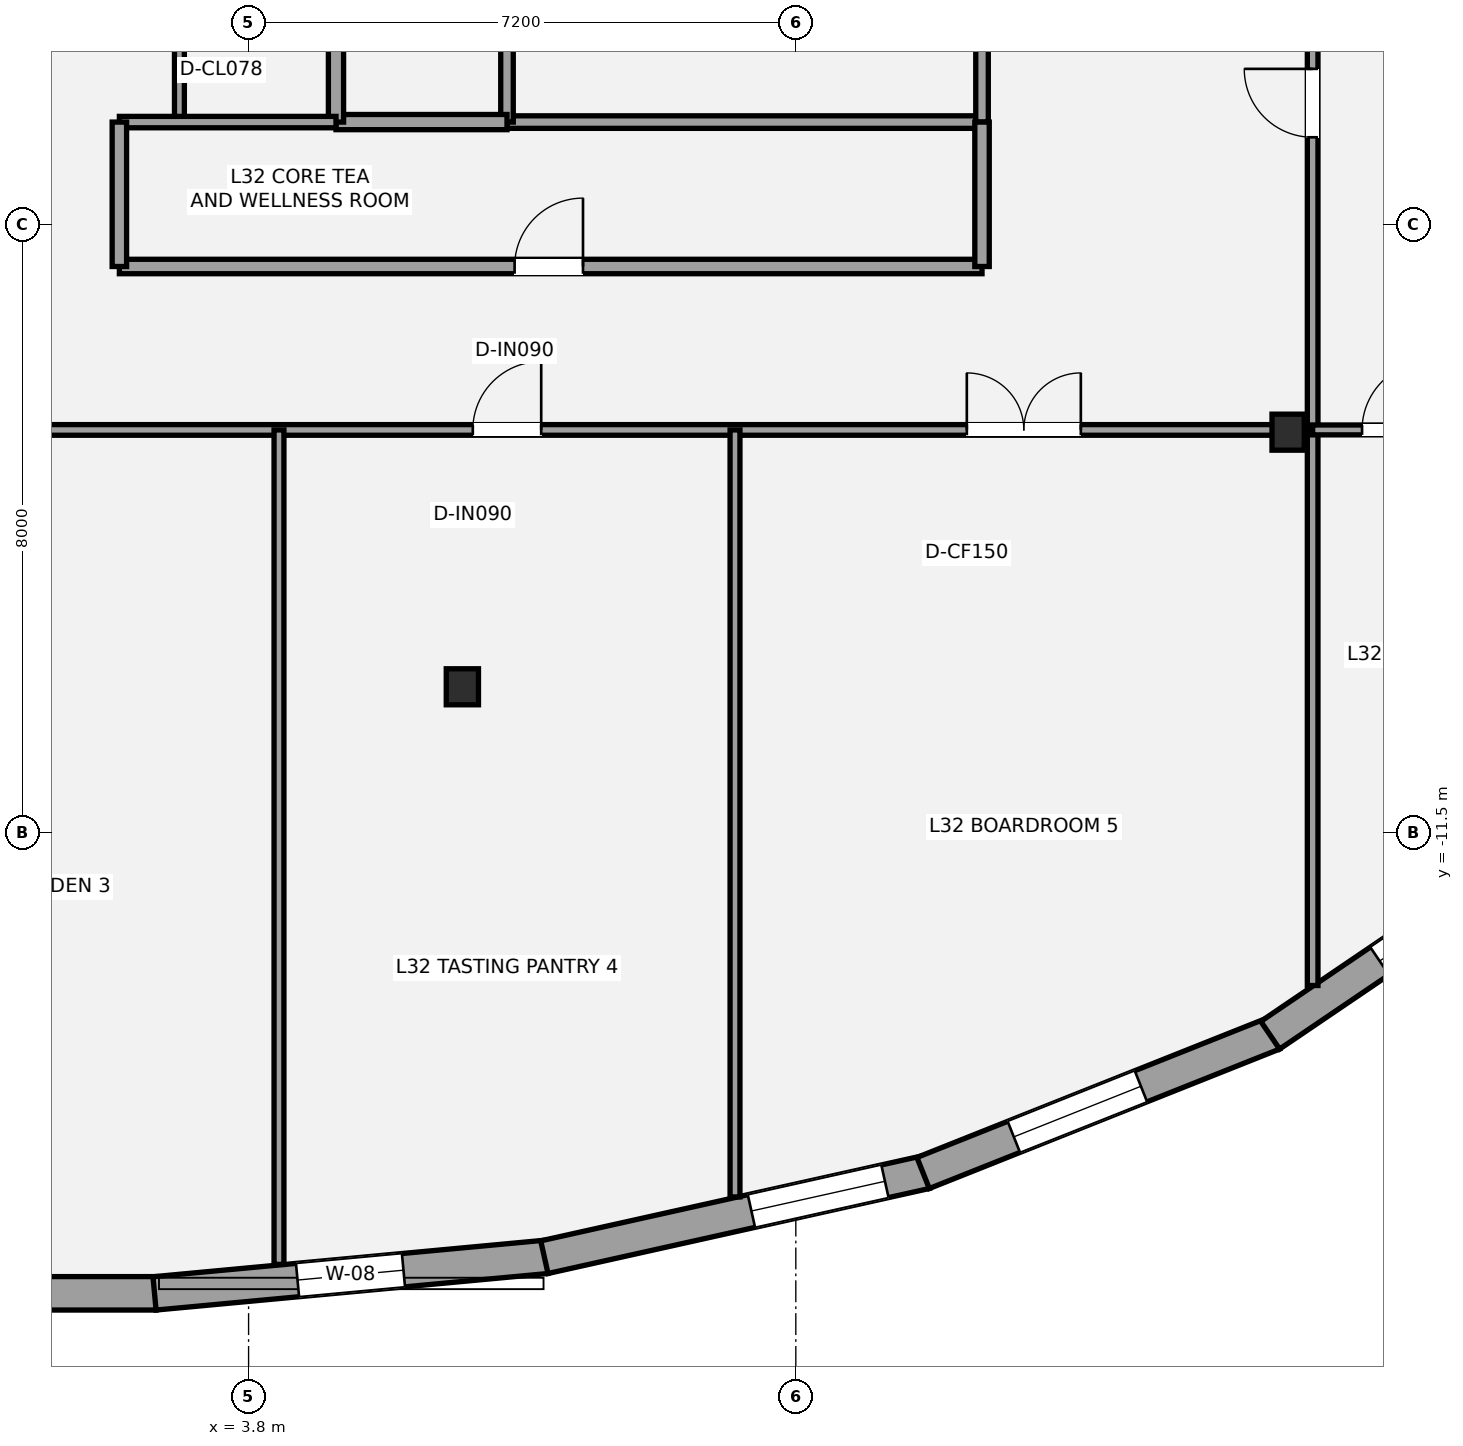
"""IFC4 building model, lengths in metres.
Left out: names, types, materials, properties, quantities, classifications, styles, units other than length and angle.
Written with IfcOpenShell. Run it as: python <this file> out.ifc"""

import sys

from ifc_helpers import new_model, si_unit, direction, frame, frame_2d, origin, origin_2d, place, context, subcontext, project, spatial, rectangle, i_section, extrude, element, fill, save


model = new_model("IFC4")
c1 = context("Model", 3, precision=1e-05, world=origin(), true_north=direction((0.0, 1.0)))
c2 = subcontext(c1, "Body", "Model", "MODEL_VIEW")
j1 = project(units=[si_unit("LENGTHUNIT", "METRE"), si_unit("PLANEANGLEUNIT", "RADIAN")], contexts=[c1])
p1 = place(None, origin())
s1 = spatial("IfcSite", under=j1, at=p1, CompositionType="ELEMENT")
p2 = place(p1, origin())
s2 = spatial("IfcBuilding", under=s1, at=p2, CompositionType="ELEMENT")
p3 = place(p2, frame((0.0, 0.0, 121.1)))
s3 = spatial("IfcBuildingStorey", under=s2, at=p3, CompositionType="ELEMENT", Elevation=121.1)
for number, where, z_axis, x_axis in (
    (1, (6.613, -9.579, 0.0), (0.0, 0.0, 1.0), (1.0, 0.0, 0.0)),
    (2, (17.477, -6.229, 0.0), (0.0, 0.0, 1.0), (1.0, 0.0, 0.0)),
):
    element("IfcColumn", number, at=place(p3, frame(where, z_axis=z_axis, x_axis=x_axis)), inside=s3, PredefinedType="COLUMN", context=c2, shape_type="SweptSolid", body=[
        extrude(i_section(OverallWidth=0.424, OverallDepth=0.474, WebThickness=0.048, FlangeThickness=0.077, at=origin_2d()), origin(), (0.0, 0.0, 1.0), 3.5),
    ])
p4 = place(p3, frame((2.583, -17.559, 0.0), z_axis=(0.0, 0.0, 1.0), x_axis=(-1.0, 0.0, 0.0)))
e3 = element("IfcWall", 3, at=p4, inside=s3, PredefinedType="STANDARD", context=c2, shape_type="SweptSolid", body=[
    extrude(rectangle(XDim=5.166, YDim=0.44, at=frame_2d((2.583, 0.0))), origin(), (0.0, 0.0, 1.0), 2.528),
])
p5 = place(p4, frame((1.436, 0.0, 0.65)))
e4 = element("IfcOpeningElement", 4, at=p5, cuts=e3, PredefinedType="OPENING", context=c2, shape_type="SweptSolid", body=[
    extrude(rectangle(XDim=1.8, YDim=1.7, at=frame_2d((0.9, 0.85))), frame((0.0, 0.23, 0.0), z_axis=(0.0, -1.0, 0.0), x_axis=(1.0, 0.0, 0.0)), (0.0, 0.0, 1.0), 0.46),
])
p6 = place(p3, frame((7.719, -17.079, 0.0), z_axis=(0.0, 0.0, 1.0), x_axis=(-0.995683099415, -0.092817916047, 0.0)))
e5 = element("IfcWall", 5, at=p6, inside=s3, PredefinedType="STANDARD", context=c2, shape_type="SweptSolid", body=[
    extrude(rectangle(XDim=5.179, YDim=0.44, at=frame_2d((2.59, 0.0))), origin(), (0.0, 0.0, 1.0), 2.528),
])
p7 = place(p6, frame((1.89, 0.0, 0.85)))
e6 = element("IfcOpeningElement", 6, at=p7, cuts=e5, PredefinedType="OPENING", context=c2, shape_type="SweptSolid", body=[
    extrude(rectangle(XDim=1.4, YDim=1.55, at=frame_2d((0.7, 0.775))), frame((0.0, 0.23, 0.0), z_axis=(0.0, -1.0, 0.0), x_axis=(1.0, 0.0, 0.0)), (0.0, 0.0, 1.0), 0.46),
])
p8 = place(p3, frame((12.708, -15.966, 0.0), z_axis=(0.0, 0.0, 1.0), x_axis=(-0.976058355685, -0.217508818896, 0.0)))
e7 = element("IfcWall", 7, at=p8, inside=s3, PredefinedType="STANDARD", context=c2, shape_type="SweptSolid", body=[
    extrude(rectangle(XDim=5.14, YDim=0.44, at=frame_2d((2.57, 0.0))), origin(), (0.0, 0.0, 1.0), 2.528),
])
p9 = place(p8, frame((0.549, 0.0, 0.65)))
e8 = element("IfcOpeningElement", 8, at=p9, cuts=e7, PredefinedType="OPENING", context=c2, shape_type="SweptSolid", body=[
    extrude(rectangle(XDim=1.8, YDim=1.7, at=frame_2d((0.9, 0.85))), frame((0.0, 0.23, 0.0), z_axis=(0.0, -1.0, 0.0), x_axis=(1.0, 0.0, 0.0)), (0.0, 0.0, 1.0), 0.46),
])
p10 = place(p3, frame((17.284, -14.141, 0.0), z_axis=(0.0, 0.0, 1.0), x_axis=(-0.929089765506, -0.369854305953, 0.0)))
e9 = element("IfcWall", 9, at=p10, inside=s3, PredefinedType="STANDARD", context=c2, shape_type="SweptSolid", body=[
    extrude(rectangle(XDim=4.961, YDim=0.44, at=frame_2d((2.48, 0.0))), origin(), (0.0, 0.0, 1.0), 2.528),
])
p11 = place(p10, frame((1.876, 0.0, 0.65)))
e10 = element("IfcOpeningElement", 10, at=p11, cuts=e9, PredefinedType="OPENING", context=c2, shape_type="SweptSolid", body=[
    extrude(rectangle(XDim=1.8, YDim=1.7, at=frame_2d((0.9, 0.85))), frame((0.0, 0.23, 0.0), z_axis=(0.0, -1.0, 0.0), x_axis=(1.0, 0.0, 0.0)), (0.0, 0.0, 1.0), 0.46),
])
p12 = place(p3, frame((21.036, -11.591, 0.0), z_axis=(0.0, 0.0, 1.0), x_axis=(-0.827707240431, -0.56116015908, 0.0)))
e11 = element("IfcWall", 11, at=p12, inside=s3, PredefinedType="STANDARD", context=c2, shape_type="SweptSolid", body=[
    extrude(rectangle(XDim=4.584, YDim=0.44, at=frame_2d((2.292, 0.0))), origin(), (0.0, 0.0, 1.0), 2.528),
])
p13 = place(p12, frame((1.044, 0.0, 0.65)))
e12 = element("IfcOpeningElement", 12, at=p13, cuts=e11, PredefinedType="OPENING", context=c2, shape_type="SweptSolid", body=[
    extrude(rectangle(XDim=1.8, YDim=1.7, at=frame_2d((0.9, 0.85))), frame((0.0, 0.23, 0.0), z_axis=(0.0, -1.0, 0.0), x_axis=(1.0, 0.0, 0.0)), (0.0, 0.0, 1.0), 0.46),
])
p14 = place(p3, frame((7.2, -2.15, 0.0), z_axis=(0.0, 0.0, 1.0), x_axis=(1.0, 0.0, 0.0)))
e13 = element("IfcWall", 13, at=p14, inside=s3, PredefinedType="PARTITIONING", context=c2, shape_type="SweptSolid", body=[
    extrude(rectangle(XDim=6.25, YDim=0.165, at=frame_2d((3.125, 0.0))), origin(), (0.0, 0.0, 1.0), 3.31),
])
p15 = place(p3, frame((7.2, -2.15, 0.0), z_axis=(0.0, 0.0, 1.0), x_axis=(0.0, 1.0, 0.0)))
e14 = element("IfcWall", 14, at=p15, inside=s3, PredefinedType="PARTITIONING", context=c2, shape_type="SweptSolid", body=[
    extrude(rectangle(XDim=3.3, YDim=0.165, at=frame_2d((1.65, 0.0))), origin(), (0.0, 0.0, 1.0), 2.763),
])
p16 = place(p3, frame((13.45, -2.15, 0.0), z_axis=(0.0, 0.0, 1.0), x_axis=(0.0, 1.0, 0.0)))
e15 = element("IfcWall", 15, at=p16, inside=s3, PredefinedType="PARTITIONING", context=c2, shape_type="SweptSolid", body=[
    extrude(rectangle(XDim=3.3, YDim=0.165, at=frame_2d((1.65, 0.0))), origin(), (0.0, 0.0, 1.0), 2.763),
])
p17 = place(p16, frame((1.15, 0.0, 0.0)))
e16 = element("IfcOpeningElement", 16, at=p17, cuts=e15, PredefinedType="OPENING", context=c2, shape_type="SweptSolid", body=[
    extrude(rectangle(XDim=1.05, YDim=2.15, at=frame_2d((0.525, 1.075))), frame((0.0, 0.093, 0.0), z_axis=(0.0, -1.0, 0.0), x_axis=(1.0, 0.0, 0.0)), (0.0, 0.0, 1.0), 0.185),
])
p18 = place(p3, frame((4.95, -2.15, 0.0), z_axis=(0.0, 0.0, 1.0), x_axis=(1.0, 0.0, 0.0)))
e17 = element("IfcWall", 17, at=p18, inside=s3, PredefinedType="SOLIDWALL", context=c2, shape_type="SweptSolid", body=[
    extrude(rectangle(XDim=2.25, YDim=0.2, at=frame_2d((1.125, 0.0))), origin(), (0.0, 0.0, 1.0), 3.31),
])
p19 = place(p3, frame((4.95, -2.15, 0.0), z_axis=(0.0, 0.0, 1.0), x_axis=(0.0, 1.0, 0.0)))
e18 = element("IfcWall", 18, at=p19, inside=s3, PredefinedType="SOLIDWALL", context=c2, shape_type="SweptSolid", body=[
    extrude(rectangle(XDim=3.3, YDim=0.2, at=frame_2d((1.65, 0.0))), origin(), (0.0, 0.0, 1.0), 2.763),
])
p20 = place(p19, frame((0.95, 0.0, 0.0)))
e19 = element("IfcOpeningElement", 19, at=p20, cuts=e18, PredefinedType="OPENING", context=c2, shape_type="SweptSolid", body=[
    extrude(rectangle(XDim=0.75, YDim=2.1, at=frame_2d((0.375, 1.05))), frame((0.0, 0.11, 0.0), z_axis=(0.0, -1.0, 0.0), x_axis=(1.0, 0.0, 0.0)), (0.0, 0.0, 1.0), 0.22),
])
p21 = place(p3, frame((2.89, -2.15, 0.0), z_axis=(0.0, 0.0, 1.0), x_axis=(0.0, 1.0, 0.0)))
e20 = element("IfcWall", 20, at=p21, inside=s3, PredefinedType="PARTITIONING", context=c2, shape_type="SweptSolid", body=[
    extrude(rectangle(XDim=1.8, YDim=0.13, at=frame_2d((0.9, 0.0))), origin(), (0.0, 0.0, 1.0), 3.31),
])
p22 = place(p3, frame((2.1, -4.05, 0.0), z_axis=(0.0, 0.0, 1.0), x_axis=(1.0, 0.0, 0.0)))
e21 = element("IfcWall", 21, at=p22, inside=s3, PredefinedType="PLUMBINGWALL", context=c2, shape_type="SweptSolid", body=[
    extrude(rectangle(XDim=11.35, YDim=0.19, at=frame_2d((5.675, 0.0))), origin(), (0.0, 0.0, 1.0), 2.763),
])
p23 = place(p22, frame((5.2, 0.0, 0.0)))
e22 = element("IfcOpeningElement", 22, at=p23, cuts=e21, PredefinedType="OPENING", context=c2, shape_type="SweptSolid", body=[
    extrude(rectangle(XDim=0.9, YDim=2.1, at=frame_2d((0.45, 1.05))), frame((0.0, 0.105, 0.0), z_axis=(0.0, -1.0, 0.0), x_axis=(1.0, 0.0, 0.0)), (0.0, 0.0, 1.0), 0.21),
])
p24 = place(p3, frame((2.1, -2.15, 0.0), z_axis=(0.0, 0.0, 1.0), x_axis=(1.0, 0.0, 0.0)))
e23 = element("IfcWall", 23, at=p24, inside=s3, PredefinedType="PLUMBINGWALL", context=c2, shape_type="SweptSolid", body=[
    extrude(rectangle(XDim=2.85, YDim=0.15, at=frame_2d((1.425, 0.0))), origin(), (0.0, 0.0, 1.0), 3.31),
])
for number, where, z_axis, x_axis in (
    (24, (2.1, -4.05, 0.0), (0.0, 0.0, 1.0), (0.0, 1.0, 0.0)),
    (25, (13.45, -4.05, 0.0), (0.0, 0.0, 1.0), (0.0, 1.0, 0.0)),
):
    element("IfcWall", number, at=place(p3, frame(where, z_axis=z_axis, x_axis=x_axis)), inside=s3, PredefinedType="PLUMBINGWALL", context=c2, shape_type="SweptSolid", body=[
        extrude(rectangle(XDim=1.9, YDim=0.19, at=frame_2d((0.95, 0.0))), origin(), (0.0, 0.0, 1.0), 3.31),
    ])
p25 = place(p3, frame((-16.2, -6.2, 0.0), z_axis=(0.0, 0.0, 1.0), x_axis=(1.0, 0.0, 0.0)))
e26 = element("IfcWall", 26, at=p25, inside=s3, PredefinedType="PARTITIONING", context=c2, shape_type="SweptSolid", body=[
    extrude(rectangle(XDim=34.0, YDim=0.14, at=frame_2d((17.0, 0.0))), origin(), (0.0, 0.0, 1.0), 2.688),
])
p26 = place(p25, frame((2.75, 0.0, 0.0)))
e27 = element("IfcOpeningElement", 27, at=p26, cuts=e26, PredefinedType="OPENING", context=c2, shape_type="SweptSolid", body=[
    extrude(rectangle(XDim=0.9, YDim=2.1, at=frame_2d((0.45, 1.05))), frame((0.0, 0.08, 0.0), z_axis=(0.0, -1.0, 0.0), x_axis=(1.0, 0.0, 0.0)), (0.0, 0.0, 1.0), 0.16),
])
p27 = place(p25, frame((9.45, 0.0, 0.0)))
e28 = element("IfcOpeningElement", 28, at=p27, cuts=e26, PredefinedType="OPENING", context=c2, shape_type="SweptSolid", body=[
    extrude(rectangle(XDim=0.9, YDim=2.1, at=frame_2d((0.45, 1.05))), frame((0.0, 0.08, 0.0), z_axis=(0.0, -1.0, 0.0), x_axis=(1.0, 0.0, 0.0)), (0.0, 0.0, 1.0), 0.16),
])
p28 = place(p25, frame((16.45, 0.0, 0.0)))
e29 = element("IfcOpeningElement", 29, at=p28, cuts=e26, PredefinedType="OPENING", context=c2, shape_type="SweptSolid", body=[
    extrude(rectangle(XDim=0.9, YDim=2.1, at=frame_2d((0.45, 1.05))), frame((0.0, 0.08, 0.0), z_axis=(0.0, -1.0, 0.0), x_axis=(1.0, 0.0, 0.0)), (0.0, 0.0, 1.0), 0.16),
])
p29 = place(p25, frame((22.95, 0.0, 0.0)))
e30 = element("IfcOpeningElement", 30, at=p29, cuts=e26, PredefinedType="OPENING", context=c2, shape_type="SweptSolid", body=[
    extrude(rectangle(XDim=0.9, YDim=2.1, at=frame_2d((0.45, 1.05))), frame((0.0, 0.08, 0.0), z_axis=(0.0, -1.0, 0.0), x_axis=(1.0, 0.0, 0.0)), (0.0, 0.0, 1.0), 0.16),
])
p30 = place(p25, frame((29.45, 0.0, 0.0)))
e31 = element("IfcOpeningElement", 31, at=p30, cuts=e26, PredefinedType="OPENING", context=c2, shape_type="SweptSolid", body=[
    extrude(rectangle(XDim=1.5, YDim=2.15, at=frame_2d((0.75, 1.075))), frame((0.0, 0.08, 0.0), z_axis=(0.0, -1.0, 0.0), x_axis=(1.0, 0.0, 0.0)), (0.0, 0.0, 1.0), 0.16),
])
p31 = place(p3, frame((17.8, -13.51, 0.0), z_axis=(0.0, 0.0, 1.0), x_axis=(0.0, 1.0, 0.0)))
e32 = element("IfcWall", 32, at=p31, inside=s3, PredefinedType="PARTITIONING", context=c2, shape_type="SweptSolid", body=[
    extrude(rectangle(XDim=21.06, YDim=0.14, at=frame_2d((10.53, 0.0))), origin(), (0.0, 0.0, 1.0), 2.688),
])
p32 = place(p31, frame((11.159, 0.0, 0.0)))
e33 = element("IfcOpeningElement", 33, at=p32, cuts=e32, PredefinedType="OPENING", context=c2, shape_type="SweptSolid", body=[
    extrude(rectangle(XDim=0.9, YDim=2.1, at=frame_2d((0.45, 1.05))), frame((0.0, 0.08, 0.0), z_axis=(0.0, -1.0, 0.0), x_axis=(1.0, 0.0, 0.0)), (0.0, 0.0, 1.0), 0.16),
])
p33 = place(p31, frame((18.034, 0.0, 0.0)))
e34 = element("IfcOpeningElement", 34, at=p33, cuts=e32, PredefinedType="OPENING", context=c2, shape_type="SweptSolid", body=[
    extrude(rectangle(XDim=0.9, YDim=2.1, at=frame_2d((0.45, 1.05))), frame((0.0, 0.08, 0.0), z_axis=(0.0, -1.0, 0.0), x_axis=(1.0, 0.0, 0.0)), (0.0, 0.0, 1.0), 0.16),
])
p34 = place(p3, frame((4.2, -17.178, 0.0), z_axis=(0.0, 0.0, 1.0), x_axis=(0.0, 1.0, 0.0)))
e35 = element("IfcWall", 35, at=p34, inside=s3, PredefinedType="PARTITIONING", context=c2, shape_type="SweptSolid", body=[
    extrude(rectangle(XDim=10.978, YDim=0.13, at=frame_2d((5.489, 0.0))), origin(), (0.0, 0.0, 1.0), 2.763),
])
p35 = place(p3, frame((10.2, -16.291, 0.0), z_axis=(0.0, 0.0, 1.0), x_axis=(0.0, 1.0, 0.0)))
e36 = element("IfcWall", 36, at=p35, inside=s3, PredefinedType="PARTITIONING", context=c2, shape_type="SweptSolid", body=[
    extrude(rectangle(XDim=10.091, YDim=0.13, at=frame_2d((5.045, 0.0))), origin(), (0.0, 0.0, 1.0), 3.31),
])
p36 = place(p3, frame((17.8, -6.2, 0.0), z_axis=(0.0, 0.0, 1.0), x_axis=(1.0, 0.0, 0.0)))
e37 = element("IfcWall", 37, at=p36, inside=s3, PredefinedType="PARTITIONING", context=c2, shape_type="SweptSolid", body=[
    extrude(rectangle(XDim=6.754, YDim=0.13, at=frame_2d((3.377, 0.0))), origin(), (0.0, 0.0, 1.0), 2.763),
])
p37 = place(p36, frame((0.65, 0.0, 0.0)))
e38 = element("IfcOpeningElement", 38, at=p37, cuts=e37, PredefinedType="OPENING", context=c2, shape_type="SweptSolid", body=[
    extrude(rectangle(XDim=0.9, YDim=2.1, at=frame_2d((0.45, 1.05))), frame((0.0, 0.075, 0.0), z_axis=(0.0, -1.0, 0.0), x_axis=(1.0, 0.0, 0.0)), (0.0, 0.0, 1.0), 0.15),
])
p38 = place(p7, origin())
e39 = element("IfcWindow", 39, at=p38, inside=s3, PartitioningType="SINGLE_PANEL", PredefinedType="WINDOW", context=c2, shape_type="SweptSolid", body=[
    extrude(rectangle(XDim=1.4, YDim=1.55, at=frame_2d((0.7, 0.775))), frame((0.0, -0.01, 0.0), z_axis=(0.0, -1.0, 0.0), x_axis=(1.0, 0.0, 0.0)), (0.0, 0.0, 1.0), 0.06),
])
fill(e6, e39)
p39 = place(p9, origin())
e40 = element("IfcWindow", 40, at=p39, inside=s3, PartitioningType="SINGLE_PANEL", PredefinedType="WINDOW", context=c2, shape_type="SweptSolid", body=[
    extrude(rectangle(XDim=1.8, YDim=1.7, at=frame_2d((0.9, 0.85))), frame((0.0, -0.01, 0.0), z_axis=(0.0, -1.0, 0.0), x_axis=(1.0, 0.0, 0.0)), (0.0, 0.0, 1.0), 0.06),
])
fill(e8, e40)
p40 = place(p11, origin())
e41 = element("IfcWindow", 41, at=p40, inside=s3, PartitioningType="SINGLE_PANEL", PredefinedType="WINDOW", context=c2, shape_type="SweptSolid", body=[
    extrude(rectangle(XDim=1.8, YDim=1.7, at=frame_2d((0.9, 0.85))), frame((0.0, -0.01, 0.0), z_axis=(0.0, -1.0, 0.0), x_axis=(1.0, 0.0, 0.0)), (0.0, 0.0, 1.0), 0.06),
])
fill(e10, e41)
p41 = place(p13, origin())
e42 = element("IfcWindow", 42, at=p41, inside=s3, PartitioningType="SINGLE_PANEL", PredefinedType="WINDOW", context=c2, shape_type="SweptSolid", body=[
    extrude(rectangle(XDim=1.8, YDim=1.7, at=frame_2d((0.9, 0.85))), frame((0.0, -0.01, 0.0), z_axis=(0.0, -1.0, 0.0), x_axis=(1.0, 0.0, 0.0)), (0.0, 0.0, 1.0), 0.06),
])
fill(e12, e42)
p42 = place(p23, origin())
e43 = element("IfcDoor", 43, at=p42, inside=s3, OperationType="SINGLE_SWING_RIGHT", PredefinedType="DOOR", context=c2, shape_type="SweptSolid", body=[
    extrude(rectangle(XDim=0.9, YDim=2.1, at=frame_2d((0.45, 1.05))), frame((0.0, 0.025, 0.0), z_axis=(0.0, -1.0, 0.0), x_axis=(1.0, 0.0, 0.0)), (0.0, 0.0, 1.0), 0.05),
])
fill(e22, e43)
p43 = place(p29, origin())
e44 = element("IfcDoor", 44, at=p43, inside=s3, OperationType="SINGLE_SWING_RIGHT", PredefinedType="DOOR", context=c2, shape_type="SweptSolid", body=[
    extrude(rectangle(XDim=0.9, YDim=2.1, at=frame_2d((0.45, 1.05))), frame((0.0, 0.025, 0.0), z_axis=(0.0, -1.0, 0.0), x_axis=(1.0, 0.0, 0.0)), (0.0, 0.0, 1.0), 0.05),
])
fill(e30, e44)
p44 = place(p30, origin())
e45 = element("IfcDoor", 45, at=p44, inside=s3, OperationType="DOUBLE_DOOR_SINGLE_SWING", PredefinedType="DOOR", context=c2, shape_type="SweptSolid", body=[
    extrude(rectangle(XDim=1.5, YDim=2.15, at=frame_2d((0.75, 1.075))), frame((0.0, 0.025, 0.0), z_axis=(0.0, -1.0, 0.0), x_axis=(1.0, 0.0, 0.0)), (0.0, 0.0, 1.0), 0.05),
])
fill(e31, e45)
p45 = place(p37, origin())
e46 = element("IfcDoor", 46, at=p45, inside=s3, OperationType="SINGLE_SWING_RIGHT", PredefinedType="DOOR", context=c2, shape_type="SweptSolid", body=[
    extrude(rectangle(XDim=0.9, YDim=2.1, at=frame_2d((0.45, 1.05))), frame((0.0, 0.025, 0.0), z_axis=(0.0, -1.0, 0.0), x_axis=(1.0, 0.0, 0.0)), (0.0, 0.0, 1.0), 0.05),
])
fill(e38, e46)
p46 = place(p32, origin())
e47 = element("IfcDoor", 47, at=p46, inside=s3, OperationType="SINGLE_SWING_RIGHT", PredefinedType="DOOR", context=c2, shape_type="SweptSolid", body=[
    extrude(rectangle(XDim=0.9, YDim=2.1, at=frame_2d((0.45, 1.05))), frame((0.0, 0.025, 0.0), z_axis=(0.0, -1.0, 0.0), x_axis=(1.0, 0.0, 0.0)), (0.0, 0.0, 1.0), 0.05),
])
fill(e33, e47)
save(model, sys.argv[1])
